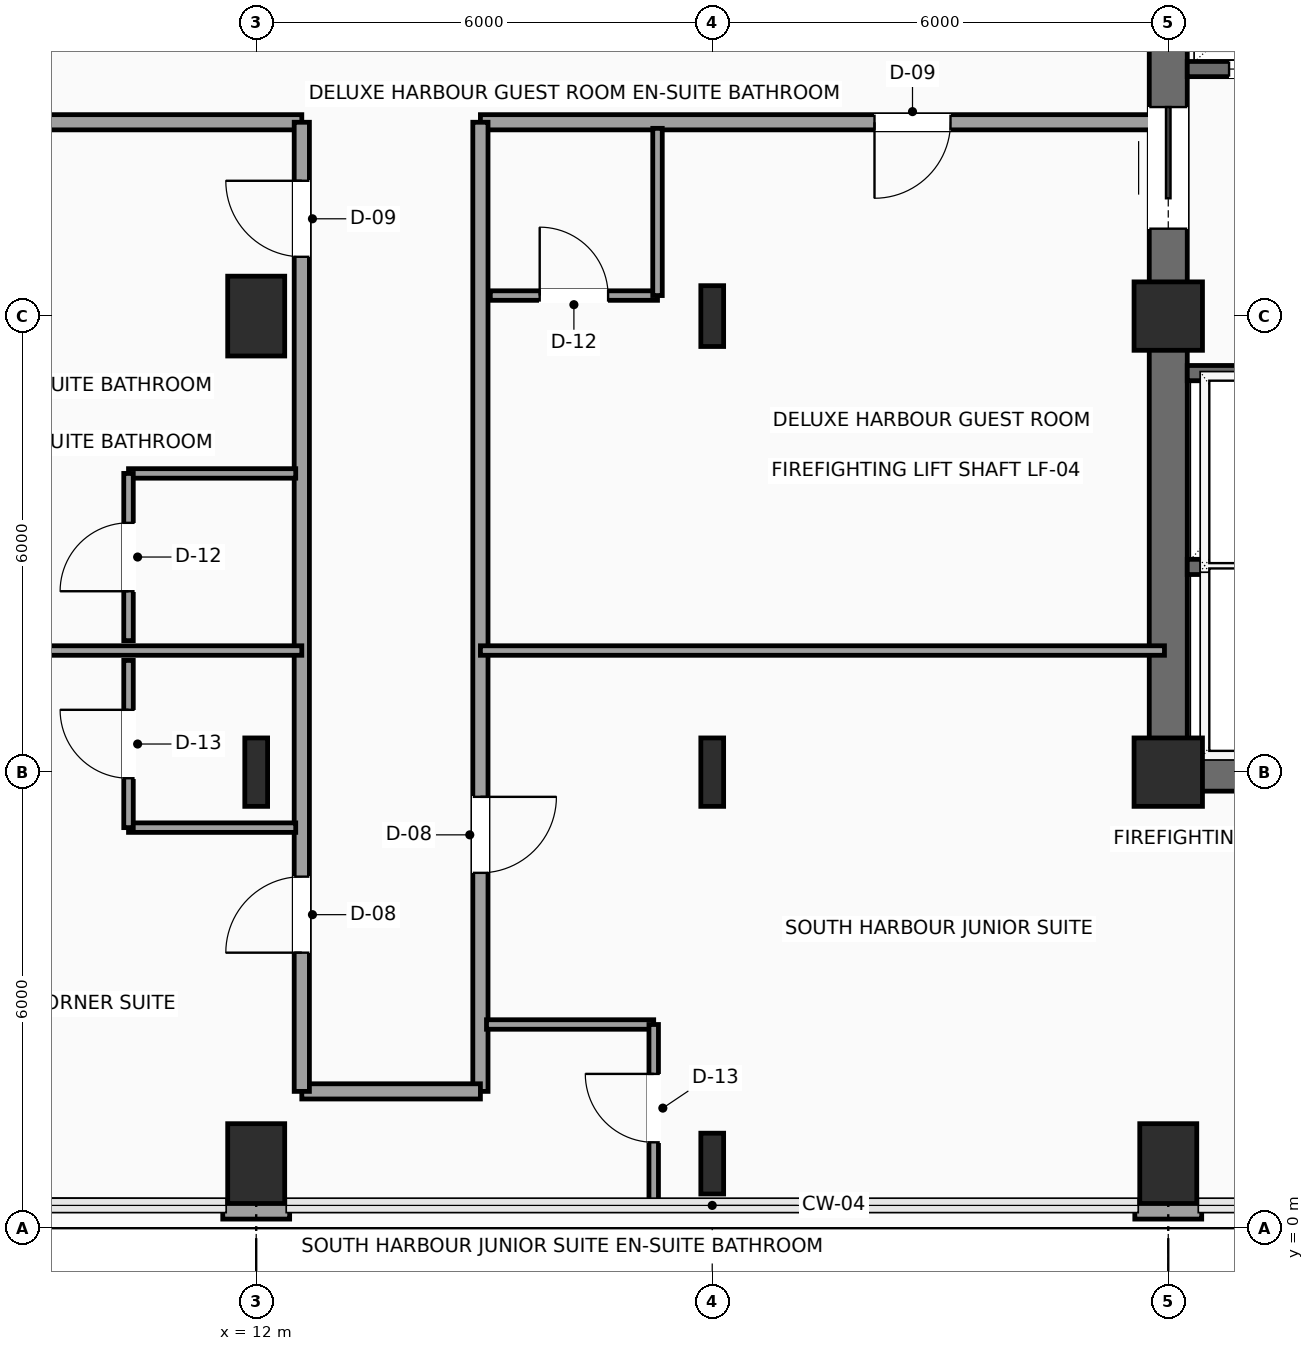
"""IFC4 building model, lengths in metres.
Left out: names, types, materials, properties, quantities, classifications, styles, units other than length and angle.
Written with IfcOpenShell. Run it as: python <this file> out.ifc"""

import sys

from ifc_helpers import new_model, si_unit, direction, frame, frame_2d, origin, origin_2d, place, context, subcontext, project, spatial, rectangle, i_section, extrude, element, fill, save


model = new_model("IFC4")
c1 = context("Model", 3, precision=1e-05, world=origin(), true_north=direction((0.0, 1.0)))
c2 = subcontext(c1, "Body", "Model", "MODEL_VIEW")
j1 = project(units=[si_unit("LENGTHUNIT", "METRE"), si_unit("PLANEANGLEUNIT", "RADIAN")], contexts=[c1])
p1 = place(None, origin())
s1 = spatial("IfcSite", under=j1, at=p1, CompositionType="ELEMENT")
p2 = place(p1, origin())
s2 = spatial("IfcBuilding", under=s1, at=p2, CompositionType="ELEMENT")
p3 = place(p2, frame((0.0, 0.0, 216.15)))
s3 = spatial("IfcBuildingStorey", under=s2, at=p3, CompositionType="ELEMENT", Elevation=216.15)
for number, where, z_axis, x_axis in (
    (1, (24.0, 6.0, 0.0), (0.0, 0.0, 1.0), (1.0, 0.0, 0.0)),
    (2, (24.0, 12.0, 0.0), (0.0, 0.0, 1.0), (1.0, 0.0, 0.0)),
):
    element("IfcColumn", number, at=place(p3, frame(where, z_axis=z_axis, x_axis=x_axis)), inside=s3, PredefinedType="COLUMN", context=c2, shape_type="SweptSolid", body=[
        extrude(rectangle(XDim=0.9, YDim=0.9, at=origin_2d()), origin(), (0.0, 0.0, 1.0), 3.75),
    ])
p4 = place(p3, frame((12.0, 0.85, 0.0), z_axis=(0.0, 0.0, 1.0), x_axis=(1.0, 0.0, 0.0)))
e3 = element("IfcColumn", 3, at=p4, inside=s3, PredefinedType="COLUMN", context=c2, shape_type="SweptSolid", body=[
    extrude(rectangle(XDim=0.75, YDim=1.05, at=origin_2d()), origin(), (0.0, 0.0, 1.0), 3.75),
])
p5 = place(p3, frame((12.0, 6.0, 0.0), z_axis=(0.0, 0.0, 1.0), x_axis=(1.0, 0.0, 0.0)))
e4 = element("IfcColumn", 4, at=p5, inside=s3, PredefinedType="COLUMN", context=c2, shape_type="SweptSolid", body=[
    extrude(i_section(OverallWidth=0.3, OverallDepth=0.9, WebThickness=0.019, FlangeThickness=0.035, FilletRadius=0.03, at=origin_2d()), origin(), (0.0, 0.0, 1.0), 3.75),
])
p6 = place(p3, frame((12.0, 12.0, 0.0), z_axis=(0.0, 0.0, 1.0), x_axis=(1.0, 0.0, 0.0)))
e5 = element("IfcColumn", 5, at=p6, inside=s3, PredefinedType="COLUMN", context=c2, shape_type="SweptSolid", body=[
    extrude(rectangle(XDim=0.75, YDim=1.05, at=origin_2d()), origin(), (0.0, 0.0, 1.0), 3.75),
])
p7 = place(p3, frame((18.0, 0.85, 0.0), z_axis=(0.0, 0.0, 1.0), x_axis=(1.0, 0.0, 0.0)))
e6 = element("IfcColumn", 6, at=p7, inside=s3, PredefinedType="COLUMN", context=c2, shape_type="SweptSolid", body=[
    extrude(i_section(OverallWidth=0.3, OverallDepth=0.8, WebThickness=0.018, FlangeThickness=0.033, FilletRadius=0.03, at=origin_2d()), origin(), (0.0, 0.0, 1.0), 3.75),
])
p8 = place(p3, frame((18.0, 6.0, 0.0), z_axis=(0.0, 0.0, 1.0), x_axis=(1.0, 0.0, 0.0)))
e7 = element("IfcColumn", 7, at=p8, inside=s3, PredefinedType="COLUMN", context=c2, shape_type="SweptSolid", body=[
    extrude(i_section(OverallWidth=0.3, OverallDepth=0.9, WebThickness=0.019, FlangeThickness=0.035, FilletRadius=0.03, at=origin_2d()), origin(), (0.0, 0.0, 1.0), 3.75),
])
p9 = place(p3, frame((18.0, 12.0, 0.0), z_axis=(0.0, 0.0, 1.0), x_axis=(1.0, 0.0, 0.0)))
e8 = element("IfcColumn", 8, at=p9, inside=s3, PredefinedType="COLUMN", context=c2, shape_type="SweptSolid", body=[
    extrude(i_section(OverallWidth=0.3, OverallDepth=0.8, WebThickness=0.018, FlangeThickness=0.033, FilletRadius=0.03, at=origin_2d()), origin(), (0.0, 0.0, 1.0), 3.75),
])
p10 = place(p3, frame((24.0, 0.85, 0.0), z_axis=(0.0, 0.0, 1.0), x_axis=(1.0, 0.0, 0.0)))
e9 = element("IfcColumn", 9, at=p10, inside=s3, PredefinedType="COLUMN", context=c2, shape_type="SweptSolid", body=[
    extrude(rectangle(XDim=0.75, YDim=1.05, at=origin_2d()), origin(), (0.0, 0.0, 1.0), 3.75),
])
for number, where, z_axis, x_axis in (
    (10, (24.44, 0.24, 0.0), (0.0, 0.0, 1.0), (-1.0, 0.0, 0.0)),
    (11, (12.44, 0.24, 0.0), (0.0, 0.0, 1.0), (-1.0, 0.0, 0.0)),
):
    element("IfcWall", number, at=place(p3, frame(where, z_axis=z_axis, x_axis=x_axis)), inside=s3, PredefinedType="SOLIDWALL", context=c2, shape_type="SweptSolid", body=[
        extrude(rectangle(XDim=0.88, YDim=0.24, at=frame_2d((0.44, 0.0))), origin(), (0.0, 0.0, 1.0), 3.54),
    ])
p11 = place(p3, frame((24.0, 6.0, 0.0), z_axis=(0.0, 0.0, 1.0), x_axis=(1.0, 0.0, 0.0)))
e12 = element("IfcWall", 12, at=p11, inside=s3, PredefinedType="SHEAR", context=c2, shape_type="SweptSolid", body=[
    extrude(rectangle(XDim=9.6, YDim=0.5, at=frame_2d((4.8, 0.0))), origin(), (0.0, 0.0, 1.0), 3.54),
])
p12 = place(p3, frame((24.0, 6.0, 0.0), z_axis=(0.0, 0.0, 1.0), x_axis=(0.0, 1.0, 0.0)))
e13 = element("IfcWall", 13, at=p12, inside=s3, PredefinedType="SHEAR", context=c2, shape_type="SweptSolid", body=[
    extrude(rectangle(XDim=12.0, YDim=0.5, at=frame_2d((6.0, 0.0))), origin(), (0.0, 0.0, 1.0), 3.54),
])
p13 = place(p12, frame((7.15, 0.0, 0.0)))
e14 = element("IfcOpeningElement", 14, at=p13, cuts=e13, PredefinedType="OPENING", context=c2, shape_type="SweptSolid", body=[
    extrude(rectangle(XDim=1.6, YDim=2.3, at=frame_2d((0.8, 1.15))), frame((0.0, 0.26, 0.0), z_axis=(0.0, -1.0, 0.0), x_axis=(1.0, 0.0, 0.0)), (0.0, 0.0, 1.0), 0.52),
])
for number, where, z_axis, x_axis in (
    (15, (24.25, 8.7, 0.0), (0.0, 0.0, 1.0), (1.0, 0.0, 0.0)),
    (16, (24.25, 11.25, 0.0), (0.0, 0.0, 1.0), (1.0, 0.0, 0.0)),
):
    element("IfcWall", number, at=place(p3, frame(where, z_axis=z_axis, x_axis=x_axis)), inside=s3, PredefinedType="SHEAR", context=c2, shape_type="SweptSolid", body=[
        extrude(rectangle(XDim=2.17, YDim=0.2, at=frame_2d((1.085, 0.0))), origin(), (0.0, 0.0, 1.0), 3.54),
    ])
p14 = place(p3, frame((24.25, 15.25, 0.0), z_axis=(0.0, 0.0, 1.0), x_axis=(1.0, 0.0, 0.0)))
e17 = element("IfcWall", 17, at=p14, inside=s3, PredefinedType="SHEAR", context=c2, shape_type="SweptSolid", body=[
    extrude(rectangle(XDim=5.2, YDim=0.2, at=frame_2d((2.6, 0.0))), origin(), (0.0, 0.0, 1.0), 3.54),
])
p15 = place(p14, frame((0.55, 0.0, 0.0)))
e18 = element("IfcOpeningElement", 18, at=p15, cuts=e17, PredefinedType="OPENING", context=c2, shape_type="SweptSolid", body=[
    extrude(rectangle(XDim=1.2, YDim=2.2, at=frame_2d((0.6, 1.1))), frame((0.0, 0.11, 0.0), z_axis=(0.0, -1.0, 0.0), x_axis=(1.0, 0.0, 0.0)), (0.0, 0.0, 1.0), 0.22),
])
p16 = place(p14, frame((3.15, 0.0, 0.0)))
e19 = element("IfcOpeningElement", 19, at=p16, cuts=e17, PredefinedType="OPENING", context=c2, shape_type="SweptSolid", body=[
    extrude(rectangle(XDim=1.2, YDim=2.2, at=frame_2d((0.6, 1.1))), frame((0.0, 0.11, 0.0), z_axis=(0.0, -1.0, 0.0), x_axis=(1.0, 0.0, 0.0)), (0.0, 0.0, 1.0), 0.22),
])
p17 = place(p3, frame((12.6, 14.55, 0.0), z_axis=(0.0, 0.0, 1.0), x_axis=(-1.0, 0.0, 0.0)))
e20 = element("IfcWall", 20, at=p17, inside=s3, PredefinedType="PARTITIONING", context=c2, shape_type="SweptSolid", body=[
    extrude(rectangle(XDim=12.3, YDim=0.2, at=frame_2d((6.15, 0.0))), origin(), (0.0, 0.0, 1.0), 3.54),
])
p18 = place(p3, frame((23.95, 14.55, 0.0), z_axis=(0.0, 0.0, 1.0), x_axis=(-1.0, 0.0, 0.0)))
e21 = element("IfcWall", 21, at=p18, inside=s3, PredefinedType="PARTITIONING", context=c2, shape_type="SweptSolid", body=[
    extrude(rectangle(XDim=9.0, YDim=0.2, at=frame_2d((4.5, 0.0))), origin(), (0.0, 0.0, 1.0), 3.54),
])
p19 = place(p18, frame((2.815, 0.0, 0.0)))
e22 = element("IfcOpeningElement", 22, at=p19, cuts=e21, PredefinedType="OPENING", context=c2, shape_type="SweptSolid", body=[
    extrude(rectangle(XDim=1.0, YDim=2.2, at=frame_2d((0.5, 1.1))), frame((0.0, 0.11, 0.0), z_axis=(0.0, -1.0, 0.0), x_axis=(1.0, 0.0, 0.0)), (0.0, 0.0, 1.0), 0.22),
])
p20 = place(p3, frame((14.95, 14.55, 0.0), z_axis=(0.0, 0.0, 1.0), x_axis=(0.0, -1.0, 0.0)))
e23 = element("IfcWall", 23, at=p20, inside=s3, PredefinedType="PARTITIONING", context=c2, shape_type="SweptSolid", body=[
    extrude(rectangle(XDim=12.75, YDim=0.2, at=frame_2d((6.375, 0.0))), origin(), (0.0, 0.0, 1.0), 3.54),
])
p21 = place(p20, frame((8.875, 0.0, 0.0)))
e24 = element("IfcOpeningElement", 24, at=p21, cuts=e23, PredefinedType="OPENING", context=c2, shape_type="SweptSolid", body=[
    extrude(rectangle(XDim=1.0, YDim=2.2, at=frame_2d((0.5, 1.1))), frame((0.0, 0.11, 0.0), z_axis=(0.0, -1.0, 0.0), x_axis=(1.0, 0.0, 0.0)), (0.0, 0.0, 1.0), 0.22),
])
p22 = place(p3, frame((14.95, 1.8, 0.0), z_axis=(0.0, 0.0, 1.0), x_axis=(-1.0, 0.0, 0.0)))
e25 = element("IfcWall", 25, at=p22, inside=s3, PredefinedType="PARTITIONING", context=c2, shape_type="SweptSolid", body=[
    extrude(rectangle(XDim=2.35, YDim=0.2, at=frame_2d((1.175, 0.0))), origin(), (0.0, 0.0, 1.0), 3.54),
])
p23 = place(p3, frame((12.6, 1.8, 0.0), z_axis=(0.0, 0.0, 1.0), x_axis=(0.0, 1.0, 0.0)))
e26 = element("IfcWall", 26, at=p23, inside=s3, PredefinedType="PARTITIONING", context=c2, shape_type="SweptSolid", body=[
    extrude(rectangle(XDim=12.75, YDim=0.2, at=frame_2d((6.375, 0.0))), origin(), (0.0, 0.0, 1.0), 3.54),
])
p24 = place(p23, frame((1.825, 0.0, 0.0)))
e27 = element("IfcOpeningElement", 27, at=p24, cuts=e26, PredefinedType="OPENING", context=c2, shape_type="SweptSolid", body=[
    extrude(rectangle(XDim=1.0, YDim=2.2, at=frame_2d((0.5, 1.1))), frame((0.0, 0.11, 0.0), z_axis=(0.0, -1.0, 0.0), x_axis=(1.0, 0.0, 0.0)), (0.0, 0.0, 1.0), 0.22),
])
p25 = place(p23, frame((10.98, 0.0, 0.0)))
e28 = element("IfcOpeningElement", 28, at=p25, cuts=e26, PredefinedType="OPENING", context=c2, shape_type="SweptSolid", body=[
    extrude(rectangle(XDim=1.0, YDim=2.2, at=frame_2d((0.5, 1.1))), frame((0.0, 0.11, 0.0), z_axis=(0.0, -1.0, 0.0), x_axis=(1.0, 0.0, 0.0)), (0.0, 0.0, 1.0), 0.22),
])
p26 = place(p3, frame((0.35, 0.35, 0.0), z_axis=(0.0, 0.0, 1.0), x_axis=(0.999991617913, -0.004094398993, 0.0)))
e29 = element("IfcWall", 29, at=p26, inside=s3, PredefinedType="PARTITIONING", context=c2, shape_type="SweptSolid", body=[
    extrude(rectangle(XDim=11.21, YDim=0.125, at=frame_2d((5.605, 0.0))), origin(), (0.0, 0.0, 1.0), 3.54),
])
p27 = place(p3, frame((0.3, 7.6, 0.0), z_axis=(0.0, 0.0, 1.0), x_axis=(1.0, 0.0, 0.0)))
e30 = element("IfcWall", 30, at=p27, inside=s3, PredefinedType="PARTITIONING", context=c2, shape_type="SweptSolid", body=[
    extrude(rectangle(XDim=12.3, YDim=0.125, at=frame_2d((6.15, 0.0))), origin(), (0.0, 0.0, 1.0), 3.54),
])
p28 = place(p3, frame((10.32, 5.27, 0.0), z_axis=(0.0, 0.0, 1.0), x_axis=(1.0, 0.0, 0.0)))
e31 = element("IfcWall", 31, at=p28, inside=s3, PredefinedType="PARTITIONING", context=c2, shape_type="SweptSolid", body=[
    extrude(rectangle(XDim=2.2, YDim=0.125, at=frame_2d((1.1, 0.0))), origin(), (0.0, 0.0, 1.0), 3.54),
])
p29 = place(p3, frame((10.32, 5.27, 0.0), z_axis=(0.0, 0.0, 1.0), x_axis=(0.0, 1.0, 0.0)))
e32 = element("IfcWall", 32, at=p29, inside=s3, PredefinedType="PARTITIONING", context=c2, shape_type="SweptSolid", body=[
    extrude(rectangle(XDim=2.2, YDim=0.125, at=frame_2d((1.1, 0.0))), origin(), (0.0, 0.0, 1.0), 3.54),
])
p30 = place(p29, frame((0.65, 0.0, 0.0)))
e33 = element("IfcOpeningElement", 33, at=p30, cuts=e32, PredefinedType="OPENING", context=c2, shape_type="SweptSolid", body=[
    extrude(rectangle(XDim=0.9, YDim=2.1, at=frame_2d((0.45, 1.05))), frame((0.0, 0.073, 0.0), z_axis=(0.0, -1.0, 0.0), x_axis=(1.0, 0.0, 0.0)), (0.0, 0.0, 1.0), 0.145),
])
p31 = place(p3, frame((10.32, 9.93, 0.0), z_axis=(0.0, 0.0, 1.0), x_axis=(1.0, 0.0, 0.0)))
e34 = element("IfcWall", 34, at=p31, inside=s3, PredefinedType="PARTITIONING", context=c2, shape_type="SweptSolid", body=[
    extrude(rectangle(XDim=2.2, YDim=0.125, at=frame_2d((1.1, 0.0))), origin(), (0.0, 0.0, 1.0), 3.54),
])
p32 = place(p3, frame((10.32, 7.73, 0.0), z_axis=(0.0, 0.0, 1.0), x_axis=(0.0, 1.0, 0.0)))
e35 = element("IfcWall", 35, at=p32, inside=s3, PredefinedType="PARTITIONING", context=c2, shape_type="SweptSolid", body=[
    extrude(rectangle(XDim=2.2, YDim=0.125, at=frame_2d((1.1, 0.0))), origin(), (0.0, 0.0, 1.0), 3.54),
])
p33 = place(p32, frame((0.65, 0.0, 0.0)))
e36 = element("IfcOpeningElement", 36, at=p33, cuts=e35, PredefinedType="OPENING", context=c2, shape_type="SweptSolid", body=[
    extrude(rectangle(XDim=0.9, YDim=2.1, at=frame_2d((0.45, 1.05))), frame((0.0, 0.073, 0.0), z_axis=(0.0, -1.0, 0.0), x_axis=(1.0, 0.0, 0.0)), (0.0, 0.0, 1.0), 0.145),
])
p34 = place(p3, frame((14.95, 7.6, 0.0), z_axis=(0.0, 0.0, 1.0), x_axis=(1.0, 0.0, 0.0)))
e37 = element("IfcWall", 37, at=p34, inside=s3, PredefinedType="PARTITIONING", context=c2, shape_type="SweptSolid", body=[
    extrude(rectangle(XDim=9.0, YDim=0.125, at=frame_2d((4.5, 0.0))), origin(), (0.0, 0.0, 1.0), 3.54),
])
p35 = place(p3, frame((15.03, 2.68, 0.0), z_axis=(0.0, 0.0, 1.0), x_axis=(1.0, 0.0, 0.0)))
e38 = element("IfcWall", 38, at=p35, inside=s3, PredefinedType="PARTITIONING", context=c2, shape_type="SweptSolid", body=[
    extrude(rectangle(XDim=2.2, YDim=0.125, at=frame_2d((1.1, 0.0))), origin(), (0.0, 0.0, 1.0), 3.54),
])
p36 = place(p3, frame((17.23, 0.3, 0.0), z_axis=(0.0, 0.0, 1.0), x_axis=(0.0, 1.0, 0.0)))
e39 = element("IfcWall", 39, at=p36, inside=s3, PredefinedType="PARTITIONING", context=c2, shape_type="SweptSolid", body=[
    extrude(rectangle(XDim=2.38, YDim=0.125, at=frame_2d((1.19, 0.0))), origin(), (0.0, 0.0, 1.0), 3.54),
])
p37 = place(p36, frame((0.83, 0.0, 0.0)))
e40 = element("IfcOpeningElement", 40, at=p37, cuts=e39, PredefinedType="OPENING", context=c2, shape_type="SweptSolid", body=[
    extrude(rectangle(XDim=0.9, YDim=2.1, at=frame_2d((0.45, 1.05))), frame((0.0, 0.073, 0.0), z_axis=(0.0, -1.0, 0.0), x_axis=(1.0, 0.0, 0.0)), (0.0, 0.0, 1.0), 0.145),
])
p38 = place(p3, frame((15.08, 12.27, 0.0), z_axis=(0.0, 0.0, 1.0), x_axis=(1.0, 0.0, 0.0)))
e41 = element("IfcWall", 41, at=p38, inside=s3, PredefinedType="PARTITIONING", context=c2, shape_type="SweptSolid", body=[
    extrude(rectangle(XDim=2.2, YDim=0.125, at=frame_2d((1.1, 0.0))), origin(), (0.0, 0.0, 1.0), 3.132),
])
p39 = place(p38, frame((0.65, 0.0, 0.0)))
e42 = element("IfcOpeningElement", 42, at=p39, cuts=e41, PredefinedType="OPENING", context=c2, shape_type="SweptSolid", body=[
    extrude(rectangle(XDim=0.9, YDim=2.1, at=frame_2d((0.45, 1.05))), frame((0.0, 0.073, 0.0), z_axis=(0.0, -1.0, 0.0), x_axis=(1.0, 0.0, 0.0)), (0.0, 0.0, 1.0), 0.145),
])
p40 = place(p3, frame((17.28, 12.27, 0.0), z_axis=(0.0, 0.0, 1.0), x_axis=(0.0, 1.0, 0.0)))
e43 = element("IfcWall", 43, at=p40, inside=s3, PredefinedType="PARTITIONING", context=c2, shape_type="SweptSolid", body=[
    extrude(rectangle(XDim=2.2, YDim=0.125, at=frame_2d((1.1, 0.0))), origin(), (0.0, 0.0, 1.0), 3.54),
])
p41 = place(p13, origin())
e44 = element("IfcDoor", 44, at=p41, inside=s3, OperationType="DOUBLE_DOOR_SLIDING", PredefinedType="DOOR", context=c2, shape_type="SweptSolid", body=[
    extrude(rectangle(XDim=1.6, YDim=2.3, at=frame_2d((0.8, 1.15))), frame((0.0, 0.025, 0.0), z_axis=(0.0, -1.0, 0.0), x_axis=(1.0, 0.0, 0.0)), (0.0, 0.0, 1.0), 0.05),
])
fill(e14, e44)
p42 = place(p15, origin())
e45 = element("IfcDoor", 45, at=p42, inside=s3, OperationType="SLIDING_TO_RIGHT", PredefinedType="DOOR", context=c2, shape_type="SweptSolid", body=[
    extrude(rectangle(XDim=1.2, YDim=2.2, at=frame_2d((0.6, 1.1))), frame((0.0, 0.025, 0.0), z_axis=(0.0, -1.0, 0.0), x_axis=(1.0, 0.0, 0.0)), (0.0, 0.0, 1.0), 0.05),
])
fill(e18, e45)
p43 = place(p19, origin())
e46 = element("IfcDoor", 46, at=p43, inside=s3, OperationType="SINGLE_SWING_RIGHT", PredefinedType="DOOR", context=c2, shape_type="SweptSolid", body=[
    extrude(rectangle(XDim=1.0, YDim=2.2, at=frame_2d((0.5, 1.1))), frame((0.0, 0.025, 0.0), z_axis=(0.0, -1.0, 0.0), x_axis=(1.0, 0.0, 0.0)), (0.0, 0.0, 1.0), 0.05),
])
fill(e22, e46)
p44 = place(p21, origin())
e47 = element("IfcDoor", 47, at=p44, inside=s3, OperationType="SINGLE_SWING_LEFT", PredefinedType="DOOR", context=c2, shape_type="SweptSolid", body=[
    extrude(rectangle(XDim=1.0, YDim=2.2, at=frame_2d((0.5, 1.1))), frame((0.0, 0.025, 0.0), z_axis=(0.0, -1.0, 0.0), x_axis=(1.0, 0.0, 0.0)), (0.0, 0.0, 1.0), 0.05),
])
fill(e24, e47)
p45 = place(p24, origin())
e48 = element("IfcDoor", 48, at=p45, inside=s3, OperationType="SINGLE_SWING_LEFT", PredefinedType="DOOR", context=c2, shape_type="SweptSolid", body=[
    extrude(rectangle(XDim=1.0, YDim=2.2, at=frame_2d((0.5, 1.1))), frame((0.0, 0.025, 0.0), z_axis=(0.0, -1.0, 0.0), x_axis=(1.0, 0.0, 0.0)), (0.0, 0.0, 1.0), 0.05),
])
fill(e27, e48)
p46 = place(p25, origin())
e49 = element("IfcDoor", 49, at=p46, inside=s3, OperationType="SINGLE_SWING_RIGHT", PredefinedType="DOOR", context=c2, shape_type="SweptSolid", body=[
    extrude(rectangle(XDim=1.0, YDim=2.2, at=frame_2d((0.5, 1.1))), frame((0.0, 0.025, 0.0), z_axis=(0.0, -1.0, 0.0), x_axis=(1.0, 0.0, 0.0)), (0.0, 0.0, 1.0), 0.05),
])
fill(e28, e49)
p47 = place(p30, origin())
e50 = element("IfcDoor", 50, at=p47, inside=s3, OperationType="SINGLE_SWING_RIGHT", PredefinedType="DOOR", context=c2, shape_type="SweptSolid", body=[
    extrude(rectangle(XDim=0.9, YDim=2.1, at=frame_2d((0.45, 1.05))), frame((0.0, 0.025, 0.0), z_axis=(0.0, -1.0, 0.0), x_axis=(1.0, 0.0, 0.0)), (0.0, 0.0, 1.0), 0.05),
])
fill(e33, e50)
p48 = place(p33, origin())
e51 = element("IfcDoor", 51, at=p48, inside=s3, OperationType="SINGLE_SWING_LEFT", PredefinedType="DOOR", context=c2, shape_type="SweptSolid", body=[
    extrude(rectangle(XDim=0.9, YDim=2.1, at=frame_2d((0.45, 1.05))), frame((0.0, 0.025, 0.0), z_axis=(0.0, -1.0, 0.0), x_axis=(1.0, 0.0, 0.0)), (0.0, 0.0, 1.0), 0.05),
])
fill(e36, e51)
p49 = place(p37, origin())
e52 = element("IfcDoor", 52, at=p49, inside=s3, OperationType="SINGLE_SWING_RIGHT", PredefinedType="DOOR", context=c2, shape_type="SweptSolid", body=[
    extrude(rectangle(XDim=0.9, YDim=2.1, at=frame_2d((0.45, 1.05))), frame((0.0, 0.025, 0.0), z_axis=(0.0, -1.0, 0.0), x_axis=(1.0, 0.0, 0.0)), (0.0, 0.0, 1.0), 0.05),
])
fill(e40, e52)
p50 = place(p39, origin())
e53 = element("IfcDoor", 53, at=p50, inside=s3, OperationType="SINGLE_SWING_LEFT", PredefinedType="DOOR", context=c2, shape_type="SweptSolid", body=[
    extrude(rectangle(XDim=0.9, YDim=2.1, at=frame_2d((0.45, 1.05))), frame((0.0, 0.025, 0.0), z_axis=(0.0, -1.0, 0.0), x_axis=(1.0, 0.0, 0.0)), (0.0, 0.0, 1.0), 0.05),
])
fill(e42, e53)
save(model, sys.argv[1])
